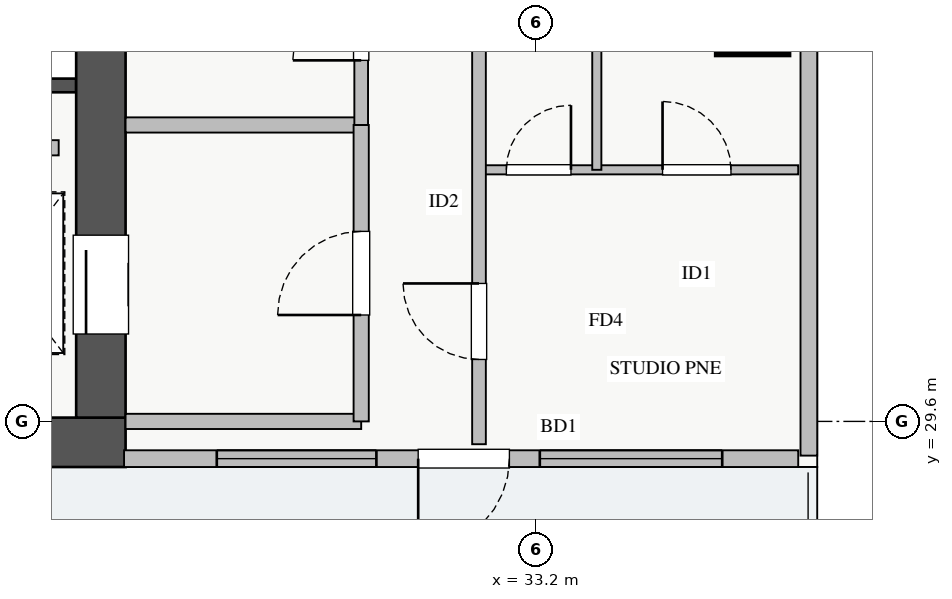
"""IFC4 building model, lengths in metres.
Left out: names, types, materials, properties, quantities, classifications, styles, units other than length and angle.
Written with IfcOpenShell. Run it as: python <this file> out.ifc"""

import sys

from ifc_helpers import new_model, si_unit, direction, frame, frame_2d, origin, origin_2d, place, context, subcontext, project, spatial, rectangle, extrude, source, transform, mapped, element, fill, save


model = new_model("IFC4")
c1 = context("Model", 3, precision=1e-05, world=origin(), true_north=direction((0.0, 1.0)))
c2 = subcontext(c1, "Body", "Model", "MODEL_VIEW")
j1 = project(units=[si_unit("LENGTHUNIT", "METRE"), si_unit("PLANEANGLEUNIT", "RADIAN")], contexts=[c1])
p1 = place(None, origin())
s1 = spatial("IfcSite", under=j1, at=p1, CompositionType="ELEMENT")
p2 = place(p1, origin())
s2 = spatial("IfcBuilding", under=s1, at=p2, CompositionType="ELEMENT")
p3 = place(p2, frame((0.0, 0.0, 153.5)))
s3 = spatial("IfcBuildingStorey", under=s2, at=p3, CompositionType="ELEMENT", Elevation=153.5)
p4 = place(p3, frame((25.8, 34.02, 0.0), z_axis=(0.0, 0.0, 1.0), x_axis=(1.0, 0.0, 0.0)))
e1 = element("IfcWall", 1, at=p4, inside=s3, PredefinedType="SHEAR", context=c2, shape_type="SweptSolid", body=[
    extrude(rectangle(XDim=1.35, YDim=0.18, at=frame_2d((0.675, 0.0))), origin(), (0.0, 0.0, 1.0), 3.07),
])
p5 = place(p3, frame((10.2, 29.325, 0.0), z_axis=(0.0, 0.0, 1.0), x_axis=(1.0, 0.0, 0.0)))
e2 = element("IfcWall", 2, at=p5, inside=s3, PredefinedType="SHEAR", context=c2, shape_type="SweptSolid", body=[
    extrude(rectangle(XDim=17.6, YDim=0.65, at=frame_2d((8.8, 0.0))), origin(), (0.0, 0.0, 1.0), 3.25),
])
p6 = place(p3, frame((27.475, 29.65, 0.0), z_axis=(0.0, 0.0, 1.0), x_axis=(0.0, 1.0, 0.0)))
e3 = element("IfcWall", 3, at=p6, inside=s3, PredefinedType="SHEAR", context=c2, shape_type="SweptSolid", body=[
    extrude(rectangle(XDim=5.9, YDim=0.65, at=frame_2d((2.95, 0.0))), origin(), (0.0, 0.0, 1.0), 3.25),
])
p7 = place(p6, frame((1.1, 0.0, 0.0)))
e4 = element("IfcOpeningElement", 4, at=p7, cuts=e3, PredefinedType="OPENING", context=c2, shape_type="SweptSolid", body=[
    extrude(rectangle(XDim=1.3, YDim=2.05, at=frame_2d((0.65, 1.025))), frame((0.0, 0.335, 0.0), z_axis=(0.0, -1.0, 0.0), x_axis=(1.0, 0.0, 0.0)), (0.0, 0.0, 1.0), 0.67),
])
m1 = source(origin(), c2, "Body", "SweptSolid", [
    extrude(rectangle(XDim=0.95, YDim=0.95, at=origin_2d()), origin(), (0.0, 0.0, 1.0), 3.25),
])
p8 = place(p3, frame((36.05, 34.9, 0.0), z_axis=(0.0, 0.0, 1.0), x_axis=(1.0, 0.0, 0.0)))
e5 = element("IfcColumn", 5, at=p8, inside=s3, PredefinedType="COLUMN", context=c2, shape_type="MappedRepresentation", body=[
    mapped(m1, transform((0.0, 0.0, 0.0), x_axis=(1.0, 0.0, 0.0), y_axis=(0.0, 1.0, 0.0), z_axis=(0.0, 0.0, 1.0), scale=1.0)),
])
p9 = place(p3, frame((27.78, 29.11, 0.0), z_axis=(0.0, 0.0, 1.0), x_axis=(1.0, 0.0, 0.0)))
e6 = element("IfcWall", 6, at=p9, inside=s3, PredefinedType="STANDARD", context=c2, shape_type="SweptSolid", body=[
    extrude(rectangle(XDim=8.87, YDim=0.22, at=frame_2d((4.435, 0.0))), origin(), (0.0, 0.0, 1.0), 2.61),
])
p10 = place(p9, frame((3.87, 0.0, 0.0)))
e7 = element("IfcOpeningElement", 7, at=p10, cuts=e6, PredefinedType="OPENING", context=c2, shape_type="SweptSolid", body=[
    extrude(rectangle(XDim=1.2, YDim=2.1, at=frame_2d((0.6, 1.05))), frame((0.0, 0.12, 0.0), z_axis=(0.0, -1.0, 0.0), x_axis=(1.0, 0.0, 0.0)), (0.0, 0.0, 1.0), 0.24),
])
p11 = place(p9, frame((1.22, 0.0, 0.9)))
e8 = element("IfcOpeningElement", 8, at=p11, cuts=e6, PredefinedType="OPENING", context=c2, shape_type="SweptSolid", body=[
    extrude(rectangle(XDim=2.1, YDim=1.48, at=frame_2d((1.05, 0.74))), frame((0.0, 0.12, 0.0), z_axis=(0.0, -1.0, 0.0), x_axis=(1.0, 0.0, 0.0)), (0.0, 0.0, 1.0), 0.24),
])
p12 = place(p9, frame((5.47, 0.0, 0.9)))
e9 = element("IfcOpeningElement", 9, at=p12, cuts=e6, PredefinedType="OPENING", context=c2, shape_type="SweptSolid", body=[
    extrude(rectangle(XDim=2.4, YDim=1.48, at=frame_2d((1.2, 0.74))), frame((0.0, 0.12, 0.0), z_axis=(0.0, -1.0, 0.0), x_axis=(1.0, 0.0, 0.0)), (0.0, 0.0, 1.0), 0.24),
])
p13 = place(p3, frame((36.79, 29.15, 0.0), z_axis=(0.0, 0.0, 1.0), x_axis=(0.0, 1.0, 0.0)))
e10 = element("IfcWall", 10, at=p13, inside=s3, PredefinedType="STANDARD", context=c2, shape_type="SweptSolid", body=[
    extrude(rectangle(XDim=6.3, YDim=0.22, at=frame_2d((3.15, 0.0))), origin(), (0.0, 0.0, 1.0), 2.61),
])
for number, where, z_axis, x_axis in (
    (11, (27.8, 29.6, 0.0), (0.0, 0.0, 1.0), (1.0, 0.0, 0.0)),
    (12, (27.8, 33.5, 0.0), (0.0, 0.0, 1.0), (1.0, 0.0, 0.0)),
):
    element("IfcWall", number, at=place(p3, frame(where, z_axis=z_axis, x_axis=x_axis)), inside=s3, PredefinedType="PARTITIONING", context=c2, shape_type="SweptSolid", body=[
        extrude(rectangle(XDim=3.1, YDim=0.2, at=frame_2d((1.55, 0.0))), origin(), (0.0, 0.0, 1.0), 3.07),
    ])
p14 = place(p3, frame((30.9, 29.6, 0.0), z_axis=(0.0, 0.0, 1.0), x_axis=(0.0, 1.0, 0.0)))
e13 = element("IfcWall", 13, at=p14, inside=s3, PredefinedType="PARTITIONING", context=c2, shape_type="SweptSolid", body=[
    extrude(rectangle(XDim=3.9, YDim=0.2, at=frame_2d((1.95, 0.0))), origin(), (0.0, 0.0, 1.0), 3.07),
])
p15 = place(p14, frame((1.4, 0.0, 0.0)))
e14 = element("IfcOpeningElement", 14, at=p15, cuts=e13, PredefinedType="OPENING", context=c2, shape_type="SweptSolid", body=[
    extrude(rectangle(XDim=1.1, YDim=2.05, at=frame_2d((0.55, 1.025))), frame((0.0, 0.11, 0.0), z_axis=(0.0, -1.0, 0.0), x_axis=(1.0, 0.0, 0.0)), (0.0, 0.0, 1.0), 0.22),
])
p16 = place(p3, frame((21.75, 33.2, 0.0), z_axis=(0.0, 0.0, 1.0), x_axis=(1.0, 0.0, 0.0)))
e15 = element("IfcWall", 15, at=p16, inside=s3, PredefinedType="PARTITIONING", context=c2, shape_type="SweptSolid", body=[
    extrude(rectangle(XDim=5.17, YDim=0.2, at=frame_2d((2.585, 0.0))), origin(), (0.0, 0.0, 1.0), 3.07),
])
p17 = place(p3, frame((30.9, 33.5, 0.0), z_axis=(0.0, 0.0, 1.0), x_axis=(0.0, 1.0, 0.0)))
e16 = element("IfcWall", 16, at=p17, inside=s3, PredefinedType="PARTITIONING", context=c2, shape_type="SweptSolid", body=[
    extrude(rectangle(XDim=2.7, YDim=0.18, at=frame_2d((1.35, 0.0))), origin(), (0.0, 0.0, 1.0), 2.577),
])
p18 = place(p17, frame((0.85, 0.0, 0.0)))
e17 = element("IfcOpeningElement", 17, at=p18, cuts=e16, PredefinedType="OPENING", context=c2, shape_type="SweptSolid", body=[
    extrude(rectangle(XDim=0.9, YDim=2.05, at=frame_2d((0.45, 1.025))), frame((0.0, 0.1, 0.0), z_axis=(0.0, -1.0, 0.0), x_axis=(1.0, 0.0, 0.0)), (0.0, 0.0, 1.0), 0.2),
])
p19 = place(p3, frame((32.45, 32.91, 0.0), z_axis=(0.0, 0.0, 1.0), x_axis=(1.0, 0.0, 0.0)))
e18 = element("IfcWall", 18, at=p19, inside=s3, PredefinedType="PLUMBINGWALL", context=c2, shape_type="SweptSolid", body=[
    extrude(rectangle(XDim=4.2, YDim=0.12, at=frame_2d((2.1, 0.0))), origin(), (0.0, 0.0, 1.0), 3.07),
])
p20 = place(p19, frame((0.36, 0.0, 0.0)))
e19 = element("IfcOpeningElement", 19, at=p20, cuts=e18, PredefinedType="OPENING", context=c2, shape_type="SweptSolid", body=[
    extrude(rectangle(XDim=0.85, YDim=2.05, at=frame_2d((0.425, 1.025))), frame((0.0, 0.07, 0.0), z_axis=(0.0, -1.0, 0.0), x_axis=(1.0, 0.0, 0.0)), (0.0, 0.0, 1.0), 0.14),
])
p21 = place(p19, frame((2.415, 0.0, 0.0)))
e20 = element("IfcOpeningElement", 20, at=p21, cuts=e18, PredefinedType="OPENING", context=c2, shape_type="SweptSolid", body=[
    extrude(rectangle(XDim=0.9, YDim=2.05, at=frame_2d((0.45, 1.025))), frame((0.0, 0.07, 0.0), z_axis=(0.0, -1.0, 0.0), x_axis=(1.0, 0.0, 0.0)), (0.0, 0.0, 1.0), 0.14),
])
p22 = place(p3, frame((34.0, 32.91, 0.0), z_axis=(0.0, 0.0, 1.0), x_axis=(0.0, 1.0, 0.0)))
e21 = element("IfcWall", 21, at=p22, inside=s3, PredefinedType="PLUMBINGWALL", context=c2, shape_type="SweptSolid", body=[
    extrude(rectangle(XDim=3.07, YDim=0.12, at=frame_2d((1.535, 0.0))), origin(), (0.0, 0.0, 1.0), 3.07),
])
p23 = place(p3, frame((32.45, 29.3, 0.0), z_axis=(0.0, 0.0, 1.0), x_axis=(0.0, 1.0, 0.0)))
e22 = element("IfcWall", 22, at=p23, inside=s3, PredefinedType="PARTITIONING", context=c2, shape_type="SweptSolid", body=[
    extrude(rectangle(XDim=11.35, YDim=0.18, at=frame_2d((5.675, 0.0))), origin(), (0.0, 0.0, 1.0), 3.07),
])
p24 = place(p23, frame((1.115, 0.0, 0.0)))
e23 = element("IfcOpeningElement", 23, at=p24, cuts=e22, PredefinedType="OPENING", context=c2, shape_type="SweptSolid", body=[
    extrude(rectangle(XDim=1.0, YDim=2.05, at=frame_2d((0.5, 1.025))), frame((0.0, 0.1, 0.0), z_axis=(0.0, -1.0, 0.0), x_axis=(1.0, 0.0, 0.0)), (0.0, 0.0, 1.0), 0.2),
])
p25 = place(p23, frame((7.12, 0.0, 0.0)))
e24 = element("IfcOpeningElement", 24, at=p25, cuts=e22, PredefinedType="OPENING", context=c2, shape_type="SweptSolid", body=[
    extrude(rectangle(XDim=0.9, YDim=2.05, at=frame_2d((0.45, 1.025))), frame((0.0, 0.1, 0.0), z_axis=(0.0, -1.0, 0.0), x_axis=(1.0, 0.0, 0.0)), (0.0, 0.0, 1.0), 0.2),
])
m2 = source(origin(), c2, "Body", "SweptSolid", [
    extrude(rectangle(XDim=1.2, YDim=2.1, at=frame_2d((0.6, 1.05))), frame((0.0, 0.025, 0.0), z_axis=(0.0, -1.0, 0.0), x_axis=(1.0, 0.0, 0.0)), (0.0, 0.0, 1.0), 0.05),
])
p26 = place(p10, frame((1.2, 0.0, 0.0), z_axis=(0.0, 0.0, 1.0), x_axis=(-1.0, 0.0, 0.0)))
e25 = element("IfcDoor", 25, at=p26, inside=s3, OperationType="SINGLE_SWING_LEFT", PredefinedType="DOOR", context=c2, shape_type="MappedRepresentation", body=[
    mapped(m2, transform((0.0, 0.0, 0.0), x_axis=(1.0, 0.0, 0.0), y_axis=(0.0, 1.0, 0.0), z_axis=(0.0, 0.0, 1.0), scale=1.0)),
])
fill(e7, e25)
m3 = source(origin(), c2, "Body", "SweptSolid", [
    extrude(rectangle(XDim=2.1, YDim=1.48, at=frame_2d((1.05, 0.74))), frame((0.0, 0.03, 0.0), z_axis=(0.0, -1.0, 0.0), x_axis=(1.0, 0.0, 0.0)), (0.0, 0.0, 1.0), 0.06),
])
p27 = place(p11, origin())
e26 = element("IfcWindow", 26, at=p27, inside=s3, PartitioningType="TRIPLE_PANEL_VERTICAL", PredefinedType="WINDOW", context=c2, shape_type="MappedRepresentation", body=[
    mapped(m3, transform((0.0, 0.0, 0.0), x_axis=(1.0, 0.0, 0.0), y_axis=(0.0, 1.0, 0.0), z_axis=(0.0, 0.0, 1.0), scale=1.0)),
])
fill(e8, e26)
m4 = source(origin(), c2, "Body", "SweptSolid", [
    extrude(rectangle(XDim=2.4, YDim=1.48, at=frame_2d((1.2, 0.74))), frame((0.0, 0.03, 0.0), z_axis=(0.0, -1.0, 0.0), x_axis=(1.0, 0.0, 0.0)), (0.0, 0.0, 1.0), 0.06),
])
p28 = place(p12, origin())
e27 = element("IfcWindow", 27, at=p28, inside=s3, PartitioningType="TRIPLE_PANEL_VERTICAL", PredefinedType="WINDOW", context=c2, shape_type="MappedRepresentation", body=[
    mapped(m4, transform((0.0, 0.0, 0.0), x_axis=(1.0, 0.0, 0.0), y_axis=(0.0, 1.0, 0.0), z_axis=(0.0, 0.0, 1.0), scale=1.0)),
])
fill(e9, e27)
m5 = source(origin(), c2, "Body", "SweptSolid", [
    extrude(rectangle(XDim=1.3, YDim=2.05, at=frame_2d((0.65, 1.025))), frame((0.0, 0.025, 0.0), z_axis=(0.0, -1.0, 0.0), x_axis=(1.0, 0.0, 0.0)), (0.0, 0.0, 1.0), 0.05),
])
p29 = place(p7, origin())
e28 = element("IfcDoor", 28, at=p29, inside=s3, OperationType="SLIDING_TO_LEFT", PredefinedType="DOOR", context=c2, shape_type="MappedRepresentation", body=[
    mapped(m5, transform((0.0, 0.0, 0.0), x_axis=(1.0, 0.0, 0.0), y_axis=(0.0, 1.0, 0.0), z_axis=(0.0, 0.0, 1.0), scale=1.0)),
])
fill(e4, e28)
m6 = source(origin(), c2, "Body", "SweptSolid", [
    extrude(rectangle(XDim=1.1, YDim=2.05, at=frame_2d((0.55, 1.025))), frame((0.0, 0.025, 0.0), z_axis=(0.0, -1.0, 0.0), x_axis=(1.0, 0.0, 0.0)), (0.0, 0.0, 1.0), 0.05),
])
p30 = place(p15, origin())
e29 = element("IfcDoor", 29, at=p30, inside=s3, OperationType="SINGLE_SWING_LEFT", PredefinedType="DOOR", context=c2, shape_type="MappedRepresentation", body=[
    mapped(m6, transform((0.0, 0.0, 0.0), x_axis=(1.0, 0.0, 0.0), y_axis=(0.0, 1.0, 0.0), z_axis=(0.0, 0.0, 1.0), scale=1.0)),
])
fill(e14, e29)
m7 = source(origin(), c2, "Body", "SweptSolid", [
    extrude(rectangle(XDim=0.9, YDim=2.05, at=frame_2d((0.45, 1.025))), frame((0.0, 0.025, 0.0), z_axis=(0.0, -1.0, 0.0), x_axis=(1.0, 0.0, 0.0)), (0.0, 0.0, 1.0), 0.05),
])
p31 = place(p18, origin())
e30 = element("IfcDoor", 30, at=p31, inside=s3, OperationType="SINGLE_SWING_LEFT", PredefinedType="DOOR", context=c2, shape_type="MappedRepresentation", body=[
    mapped(m7, transform((0.0, 0.0, 0.0), x_axis=(1.0, 0.0, 0.0), y_axis=(0.0, 1.0, 0.0), z_axis=(0.0, 0.0, 1.0), scale=1.0)),
])
fill(e17, e30)
m8 = source(origin(), c2, "Body", "SweptSolid", [
    extrude(rectangle(XDim=0.85, YDim=2.05, at=frame_2d((0.425, 1.025))), frame((0.0, 0.025, 0.0), z_axis=(0.0, -1.0, 0.0), x_axis=(1.0, 0.0, 0.0)), (0.0, 0.0, 1.0), 0.05),
])
p32 = place(p20, origin())
e31 = element("IfcDoor", 31, at=p32, inside=s3, OperationType="SINGLE_SWING_RIGHT", PredefinedType="DOOR", context=c2, shape_type="MappedRepresentation", body=[
    mapped(m8, transform((0.0, 0.0, 0.0), x_axis=(1.0, 0.0, 0.0), y_axis=(0.0, 1.0, 0.0), z_axis=(0.0, 0.0, 1.0), scale=1.0)),
])
fill(e19, e31)
p33 = place(p21, origin())
e32 = element("IfcDoor", 32, at=p33, inside=s3, OperationType="SINGLE_SWING_LEFT", PredefinedType="DOOR", context=c2, shape_type="MappedRepresentation", body=[
    mapped(m7, transform((0.0, 0.0, 0.0), x_axis=(1.0, 0.0, 0.0), y_axis=(0.0, 1.0, 0.0), z_axis=(0.0, 0.0, 1.0), scale=1.0)),
])
fill(e20, e32)
m9 = source(origin(), c2, "Body", "SweptSolid", [
    extrude(rectangle(XDim=1.0, YDim=2.05, at=frame_2d((0.5, 1.025))), frame((0.0, 0.025, 0.0), z_axis=(0.0, -1.0, 0.0), x_axis=(1.0, 0.0, 0.0)), (0.0, 0.0, 1.0), 0.05),
])
p34 = place(p24, origin())
e33 = element("IfcDoor", 33, at=p34, inside=s3, OperationType="SINGLE_SWING_RIGHT", PredefinedType="DOOR", context=c2, shape_type="MappedRepresentation", body=[
    mapped(m9, transform((0.0, 0.0, 0.0), x_axis=(1.0, 0.0, 0.0), y_axis=(0.0, 1.0, 0.0), z_axis=(0.0, 0.0, 1.0), scale=1.0)),
])
fill(e23, e33)
save(model, sys.argv[1])
